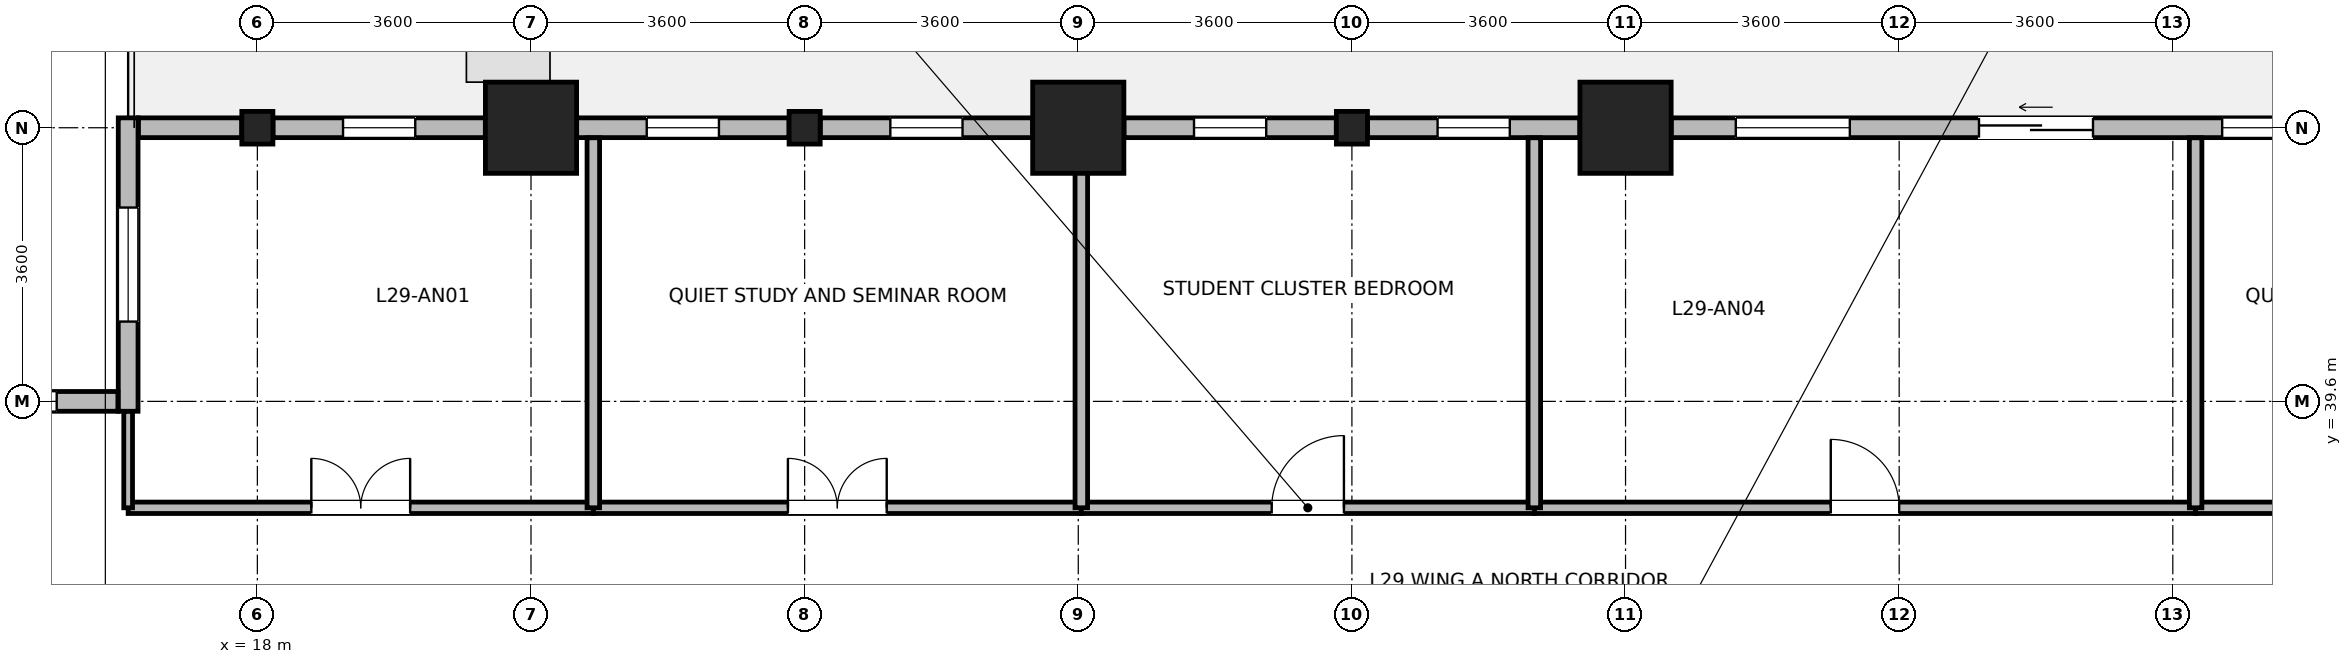
"""IFC4 building model, lengths in metres.
Left out: names, types, materials, properties, quantities, classifications, styles, units other than length and angle.
Written with IfcOpenShell. Run it as: python <this file> out.ifc"""

import sys

from ifc_helpers import new_model, si_unit, direction, frame, frame_2d, origin, origin_2d, place, context, subcontext, project, spatial, rectangle, i_section, extrude, source, transform, mapped, element, fill, save


model = new_model("IFC4")
c1 = context("Model", 3, precision=1e-05, world=origin(), true_north=direction((0.0, 1.0)))
c2 = subcontext(c1, "Body", "Model", "MODEL_VIEW")
j1 = project(units=[si_unit("LENGTHUNIT", "METRE"), si_unit("PLANEANGLEUNIT", "RADIAN")], contexts=[c1])
p1 = place(None, origin())
s1 = spatial("IfcSite", under=j1, at=p1, CompositionType="ELEMENT")
p2 = place(p1, origin())
s2 = spatial("IfcBuilding", under=s1, at=p2, CompositionType="ELEMENT")
p3 = place(p2, frame((0.0, 0.0, 115.6)))
s3 = spatial("IfcBuildingStorey", under=s2, at=p3, CompositionType="ELEMENT", Elevation=115.6)
m1 = source(origin(), c2, "Body", "SweptSolid", [
    extrude(rectangle(XDim=1.2, YDim=1.2, at=origin_2d()), origin(), (0.0, 0.0, 1.0), 3.7),
])
for number, where, z_axis, x_axis in (
    (1, (21.6, 43.2, 0.0), (0.0, 0.0, 1.0), (1.0, 0.0, 0.0)),
    (2, (28.8, 43.2, 0.0), (0.0, 0.0, 1.0), (1.0, 0.0, 0.0)),
    (3, (36.0, 43.2, 0.0), (0.0, 0.0, 1.0), (1.0, 0.0, 0.0)),
):
    element("IfcColumn", number, at=place(p3, frame(where, z_axis=z_axis, x_axis=x_axis)), inside=s3, PredefinedType="COLUMN", context=c2, shape_type="MappedRepresentation", body=[
        mapped(m1, transform((0.0, 0.0, 0.0), x_axis=(1.0, 0.0, 0.0), y_axis=(0.0, 1.0, 0.0), z_axis=(0.0, 0.0, 1.0), scale=1.0)),
    ])
m2 = source(origin(), c2, "Body", "SweptSolid", [
    extrude(i_section(OverallWidth=0.409, OverallDepth=0.43, WebThickness=0.024, FlangeThickness=0.033, FilletRadius=0.015, at=origin_2d()), origin(), (0.0, 0.0, 1.0), 3.7),
])
for number, where, z_axis, x_axis in (
    (4, (18.0, 43.2, 0.0), (0.0, 0.0, 1.0), (1.0, 0.0, 0.0)),
    (5, (25.2, 43.2, 0.0), (0.0, 0.0, 1.0), (1.0, 0.0, 0.0)),
    (6, (32.4, 43.2, 0.0), (0.0, 0.0, 1.0), (1.0, 0.0, 0.0)),
):
    element("IfcColumn", number, at=place(p3, frame(where, z_axis=z_axis, x_axis=x_axis)), inside=s3, PredefinedType="COLUMN", context=c2, shape_type="MappedRepresentation", body=[
        mapped(m2, transform((0.0, 0.0, 0.0), x_axis=(1.0, 0.0, 0.0), y_axis=(0.0, 1.0, 0.0), z_axis=(0.0, 0.0, 1.0), scale=1.0)),
    ])
p4 = place(p3, frame((36.601, 43.2, 0.0), z_axis=(0.0, 0.0, 1.0), x_axis=(1.0, 0.0, 0.0)))
e7 = element("IfcWall", 7, at=p4, inside=s3, PredefinedType="STANDARD", context=c2, shape_type="SweptSolid", body=[
    extrude(rectangle(XDim=9.598, YDim=0.26, at=frame_2d((4.799, 0.0))), origin(), (0.0, 0.0, 1.0), 2.98),
])
p5 = place(p4, frame((4.049, 0.0, 0.0)))
e8 = element("IfcOpeningElement", 8, at=p5, cuts=e7, PredefinedType="OPENING", context=c2, shape_type="SweptSolid", body=[
    extrude(rectangle(XDim=1.5, YDim=2.15, at=frame_2d((0.75, 1.075))), frame((0.0, 0.14, 0.0), z_axis=(0.0, -1.0, 0.0), x_axis=(1.0, 0.0, 0.0)), (0.0, 0.0, 1.0), 0.28),
])
p6 = place(p4, frame((0.85, 0.0, 0.85)))
e9 = element("IfcOpeningElement", 9, at=p6, cuts=e7, PredefinedType="OPENING", context=c2, shape_type="SweptSolid", body=[
    extrude(rectangle(XDim=1.5, YDim=1.85, at=frame_2d((0.75, 0.925))), frame((0.0, 0.14, 0.0), z_axis=(0.0, -1.0, 0.0), x_axis=(1.0, 0.0, 0.0)), (0.0, 0.0, 1.0), 0.28),
])
p7 = place(p4, frame((7.248, 0.0, 0.85)))
e10 = element("IfcOpeningElement", 10, at=p7, cuts=e7, PredefinedType="OPENING", context=c2, shape_type="SweptSolid", body=[
    extrude(rectangle(XDim=1.5, YDim=1.85, at=frame_2d((0.75, 0.925))), frame((0.0, 0.14, 0.0), z_axis=(0.0, -1.0, 0.0), x_axis=(1.0, 0.0, 0.0)), (0.0, 0.0, 1.0), 0.28),
])
p8 = place(p3, frame((32.605, 43.2, 0.0), z_axis=(0.0, 0.0, 1.0), x_axis=(1.0, 0.0, 0.0)))
e11 = element("IfcWall", 11, at=p8, inside=s3, PredefinedType="STANDARD", context=c2, shape_type="SweptSolid", body=[
    extrude(rectangle(XDim=2.793, YDim=0.26, at=frame_2d((1.397, 0.0))), origin(), (0.0, 0.0, 1.0), 2.98),
])
p9 = place(p8, frame((0.922, 0.0, 0.85)))
e12 = element("IfcOpeningElement", 12, at=p9, cuts=e11, PredefinedType="OPENING", context=c2, shape_type="SweptSolid", body=[
    extrude(rectangle(XDim=0.95, YDim=1.75, at=frame_2d((0.475, 0.875))), frame((0.0, 0.14, 0.0), z_axis=(0.0, -1.0, 0.0), x_axis=(1.0, 0.0, 0.0)), (0.0, 0.0, 1.0), 0.28),
])
p10 = place(p3, frame((29.401, 43.2, 0.0), z_axis=(0.0, 0.0, 1.0), x_axis=(1.0, 0.0, 0.0)))
e13 = element("IfcWall", 13, at=p10, inside=s3, PredefinedType="STANDARD", context=c2, shape_type="SweptSolid", body=[
    extrude(rectangle(XDim=2.794, YDim=0.26, at=frame_2d((1.397, 0.0))), origin(), (0.0, 0.0, 1.0), 2.98),
])
p11 = place(p10, frame((0.922, 0.0, 0.85)))
e14 = element("IfcOpeningElement", 14, at=p11, cuts=e13, PredefinedType="OPENING", context=c2, shape_type="SweptSolid", body=[
    extrude(rectangle(XDim=0.95, YDim=1.75, at=frame_2d((0.475, 0.875))), frame((0.0, 0.14, 0.0), z_axis=(0.0, -1.0, 0.0), x_axis=(1.0, 0.0, 0.0)), (0.0, 0.0, 1.0), 0.28),
])
p12 = place(p3, frame((25.406, 43.2, 0.0), z_axis=(0.0, 0.0, 1.0), x_axis=(1.0, 0.0, 0.0)))
e15 = element("IfcWall", 15, at=p12, inside=s3, PredefinedType="STANDARD", context=c2, shape_type="SweptSolid", body=[
    extrude(rectangle(XDim=2.793, YDim=0.26, at=frame_2d((1.397, 0.0))), origin(), (0.0, 0.0, 1.0), 2.98),
])
p13 = place(p12, frame((0.922, 0.0, 0.85)))
e16 = element("IfcOpeningElement", 16, at=p13, cuts=e15, PredefinedType="OPENING", context=c2, shape_type="SweptSolid", body=[
    extrude(rectangle(XDim=0.95, YDim=1.75, at=frame_2d((0.475, 0.875))), frame((0.0, 0.14, 0.0), z_axis=(0.0, -1.0, 0.0), x_axis=(1.0, 0.0, 0.0)), (0.0, 0.0, 1.0), 0.28),
])
p14 = place(p3, frame((22.201, 43.2, 0.0), z_axis=(0.0, 0.0, 1.0), x_axis=(1.0, 0.0, 0.0)))
e17 = element("IfcWall", 17, at=p14, inside=s3, PredefinedType="STANDARD", context=c2, shape_type="SweptSolid", body=[
    extrude(rectangle(XDim=2.793, YDim=0.26, at=frame_2d((1.397, 0.0))), origin(), (0.0, 0.0, 1.0), 2.98),
])
p15 = place(p14, frame((0.922, 0.0, 0.85)))
e18 = element("IfcOpeningElement", 18, at=p15, cuts=e17, PredefinedType="OPENING", context=c2, shape_type="SweptSolid", body=[
    extrude(rectangle(XDim=0.95, YDim=1.75, at=frame_2d((0.475, 0.875))), frame((0.0, 0.14, 0.0), z_axis=(0.0, -1.0, 0.0), x_axis=(1.0, 0.0, 0.0)), (0.0, 0.0, 1.0), 0.28),
])
p16 = place(p3, frame((18.206, 43.2, 0.0), z_axis=(0.0, 0.0, 1.0), x_axis=(1.0, 0.0, 0.0)))
e19 = element("IfcWall", 19, at=p16, inside=s3, PredefinedType="STANDARD", context=c2, shape_type="SweptSolid", body=[
    extrude(rectangle(XDim=2.793, YDim=0.26, at=frame_2d((1.397, 0.0))), origin(), (0.0, 0.0, 1.0), 2.98),
])
p17 = place(p16, frame((0.922, 0.0, 0.85)))
e20 = element("IfcOpeningElement", 20, at=p17, cuts=e19, PredefinedType="OPENING", context=c2, shape_type="SweptSolid", body=[
    extrude(rectangle(XDim=0.95, YDim=1.75, at=frame_2d((0.475, 0.875))), frame((0.0, 0.14, 0.0), z_axis=(0.0, -1.0, 0.0), x_axis=(1.0, 0.0, 0.0)), (0.0, 0.0, 1.0), 0.28),
])
p18 = place(p3, frame((16.435, 43.2, 0.0), z_axis=(0.0, 0.0, 1.0), x_axis=(1.0, 0.0, 0.0)))
e21 = element("IfcWall", 21, at=p18, inside=s3, PredefinedType="STANDARD", context=c2, shape_type="SweptSolid", body=[
    extrude(rectangle(XDim=1.359, YDim=0.26, at=frame_2d((0.68, 0.0))), origin(), (0.0, 0.0, 1.0), 2.98),
])
p19 = place(p3, frame((16.3, 39.47, 0.0), z_axis=(0.0, 0.0, 1.0), x_axis=(0.0, 1.0, 0.0)))
e22 = element("IfcWall", 22, at=p19, inside=s3, PredefinedType="STANDARD", context=c2, shape_type="SweptSolid", body=[
    extrude(rectangle(XDim=3.86, YDim=0.26, at=frame_2d((1.93, 0.0))), origin(), (0.0, 0.0, 1.0), 3.43),
])
p20 = place(p19, frame((1.18, 0.0, 0.85)))
e23 = element("IfcOpeningElement", 23, at=p20, cuts=e22, PredefinedType="OPENING", context=c2, shape_type="SweptSolid", body=[
    extrude(rectangle(XDim=1.5, YDim=1.85, at=frame_2d((0.75, 0.925))), frame((0.0, 0.14, 0.0), z_axis=(0.0, -1.0, 0.0), x_axis=(1.0, 0.0, 0.0)), (0.0, 0.0, 1.0), 0.28),
])
p21 = place(p3, frame((6.835, 39.6, 0.0), z_axis=(0.0, 0.0, 1.0), x_axis=(1.0, 0.0, 0.0)))
e24 = element("IfcWall", 24, at=p21, inside=s3, PredefinedType="STANDARD", context=c2, shape_type="SweptSolid", body=[
    extrude(rectangle(XDim=9.33, YDim=0.26, at=frame_2d((4.665, 0.0))), origin(), (0.0, 0.0, 1.0), 3.43),
])
p22 = place(p21, frame((0.805, 0.0, 0.85)))
e25 = element("IfcOpeningElement", 25, at=p22, cuts=e24, PredefinedType="OPENING", context=c2, shape_type="SweptSolid", body=[
    extrude(rectangle(XDim=1.5, YDim=1.85, at=frame_2d((0.75, 0.925))), frame((0.0, 0.14, 0.0), z_axis=(0.0, -1.0, 0.0), x_axis=(1.0, 0.0, 0.0)), (0.0, 0.0, 1.0), 0.28),
])
p23 = place(p21, frame((3.915, 0.0, 0.85)))
e26 = element("IfcOpeningElement", 26, at=p23, cuts=e24, PredefinedType="OPENING", context=c2, shape_type="SweptSolid", body=[
    extrude(rectangle(XDim=1.5, YDim=1.85, at=frame_2d((0.75, 0.925))), frame((0.0, 0.14, 0.0), z_axis=(0.0, -1.0, 0.0), x_axis=(1.0, 0.0, 0.0)), (0.0, 0.0, 1.0), 0.28),
])
p24 = place(p21, frame((7.025, 0.0, 0.85)))
e27 = element("IfcOpeningElement", 27, at=p24, cuts=e24, PredefinedType="OPENING", context=c2, shape_type="SweptSolid", body=[
    extrude(rectangle(XDim=1.5, YDim=1.85, at=frame_2d((0.75, 0.925))), frame((0.0, 0.14, 0.0), z_axis=(0.0, -1.0, 0.0), x_axis=(1.0, 0.0, 0.0)), (0.0, 0.0, 1.0), 0.28),
])
p25 = place(p3, frame((34.8, 38.2, 0.0), z_axis=(0.0, 0.0, 1.0), x_axis=(1.0, 0.0, 0.0)))
e28 = element("IfcWall", 28, at=p25, inside=s3, PredefinedType="PARTITIONING", context=c2, shape_type="SweptSolid", body=[
    extrude(rectangle(XDim=8.7, YDim=0.15, at=frame_2d((4.35, 0.0))), origin(), (0.0, 0.0, 1.0), 3.43),
])
p26 = place(p25, frame((3.9, 0.0, 0.0)))
e29 = element("IfcOpeningElement", 29, at=p26, cuts=e28, PredefinedType="OPENING", context=c2, shape_type="SweptSolid", body=[
    extrude(rectangle(XDim=0.9, YDim=2.08, at=frame_2d((0.45, 1.04))), frame((0.0, 0.085, 0.0), z_axis=(0.0, -1.0, 0.0), x_axis=(1.0, 0.0, 0.0)), (0.0, 0.0, 1.0), 0.17),
])
p27 = place(p3, frame((22.42, 38.2, 0.0), z_axis=(0.0, 0.0, 1.0), x_axis=(1.0, 0.0, 0.0)))
e30 = element("IfcWall", 30, at=p27, inside=s3, PredefinedType="PARTITIONING", context=c2, shape_type="SweptSolid", body=[
    extrude(rectangle(XDim=6.42, YDim=0.15, at=frame_2d((3.21, 0.0))), origin(), (0.0, 0.0, 1.0), 3.43),
])
p28 = place(p27, frame((2.56, 0.0, 0.0)))
e31 = element("IfcOpeningElement", 31, at=p28, cuts=e30, PredefinedType="OPENING", context=c2, shape_type="SweptSolid", body=[
    extrude(rectangle(XDim=1.3, YDim=2.12, at=frame_2d((0.65, 1.06))), frame((0.0, 0.085, 0.0), z_axis=(0.0, -1.0, 0.0), x_axis=(1.0, 0.0, 0.0)), (0.0, 0.0, 1.0), 0.17),
])
p29 = place(p3, frame((16.3, 38.2, 0.0), z_axis=(0.0, 0.0, 1.0), x_axis=(1.0, 0.0, 0.0)))
e32 = element("IfcWall", 32, at=p29, inside=s3, PredefinedType="PARTITIONING", context=c2, shape_type="SweptSolid", body=[
    extrude(rectangle(XDim=6.12, YDim=0.15, at=frame_2d((3.06, 0.0))), origin(), (0.0, 0.0, 1.0), 3.43),
])
p30 = place(p29, frame((2.41, 0.0, 0.0)))
e33 = element("IfcOpeningElement", 33, at=p30, cuts=e32, PredefinedType="OPENING", context=c2, shape_type="SweptSolid", body=[
    extrude(rectangle(XDim=1.3, YDim=2.12, at=frame_2d((0.65, 1.06))), frame((0.0, 0.085, 0.0), z_axis=(0.0, -1.0, 0.0), x_axis=(1.0, 0.0, 0.0)), (0.0, 0.0, 1.0), 0.17),
])
p31 = place(p3, frame((28.84, 38.2, 0.0), z_axis=(0.0, 0.0, 1.0), x_axis=(1.0, 0.0, 0.0)))
e34 = element("IfcWall", 34, at=p31, inside=s3, PredefinedType="PARTITIONING", context=c2, shape_type="SweptSolid", body=[
    extrude(rectangle(XDim=5.96, YDim=0.15, at=frame_2d((2.98, 0.0))), origin(), (0.0, 0.0, 1.0), 3.43),
])
p32 = place(p31, frame((2.505, 0.0, 0.0)))
e35 = element("IfcOpeningElement", 35, at=p32, cuts=e34, PredefinedType="OPENING", context=c2, shape_type="SweptSolid", body=[
    extrude(rectangle(XDim=0.95, YDim=2.1, at=frame_2d((0.475, 1.05))), frame((0.0, 0.085, 0.0), z_axis=(0.0, -1.0, 0.0), x_axis=(1.0, 0.0, 0.0)), (0.0, 0.0, 1.0), 0.17),
])
p33 = place(p3, frame((43.5, 38.2, 0.0), z_axis=(0.0, 0.0, 1.0), x_axis=(1.0, 0.0, 0.0)))
e36 = element("IfcWall", 36, at=p33, inside=s3, PredefinedType="PARTITIONING", context=c2, shape_type="SweptSolid", body=[
    extrude(rectangle(XDim=5.74, YDim=0.15, at=frame_2d((2.87, 0.0))), origin(), (0.0, 0.0, 1.0), 3.43),
])
p34 = place(p33, frame((2.22, 0.0, 0.0)))
e37 = element("IfcOpeningElement", 37, at=p34, cuts=e36, PredefinedType="OPENING", context=c2, shape_type="SweptSolid", body=[
    extrude(rectangle(XDim=1.3, YDim=2.12, at=frame_2d((0.65, 1.06))), frame((0.0, 0.085, 0.0), z_axis=(0.0, -1.0, 0.0), x_axis=(1.0, 0.0, 0.0)), (0.0, 0.0, 1.0), 0.17),
])
p35 = place(p3, frame((16.3, 38.2, 0.0), z_axis=(0.0, 0.0, 1.0), x_axis=(0.0, 1.0, 0.0)))
e38 = element("IfcWall", 38, at=p35, inside=s3, PredefinedType="PARTITIONING", context=c2, shape_type="SweptSolid", body=[
    extrude(rectangle(XDim=1.268, YDim=0.115, at=frame_2d((0.634, 0.0))), origin(), (0.0, 0.0, 1.0), 3.43),
])
p36 = place(p3, frame((22.42, 38.2, 0.0), z_axis=(0.0, 0.0, 1.0), x_axis=(0.0, 1.0, 0.0)))
e39 = element("IfcWall", 39, at=p36, inside=s3, PredefinedType="PARTITIONING", context=c2, shape_type="SweptSolid", body=[
    extrude(rectangle(XDim=4.868, YDim=0.165, at=frame_2d((2.434, 0.0))), origin(), (0.0, 0.0, 1.0), 3.43),
])
p37 = place(p3, frame((28.84, 38.2, 0.0), z_axis=(0.0, 0.0, 1.0), x_axis=(0.0, 1.0, 0.0)))
e40 = element("IfcWall", 40, at=p37, inside=s3, PredefinedType="PARTITIONING", context=c2, shape_type="SweptSolid", body=[
    extrude(rectangle(XDim=4.868, YDim=0.165, at=frame_2d((2.434, 0.0))), origin(), (0.0, 0.0, 1.0), 2.93),
])
for number, where, z_axis, x_axis in (
    (41, (34.8, 38.2, 0.0), (0.0, 0.0, 1.0), (0.0, 1.0, 0.0)),
    (42, (43.5, 38.2, 0.0), (0.0, 0.0, 1.0), (0.0, 1.0, 0.0)),
):
    element("IfcWall", number, at=place(p3, frame(where, z_axis=z_axis, x_axis=x_axis)), inside=s3, PredefinedType="PARTITIONING", context=c2, shape_type="SweptSolid", body=[
        extrude(rectangle(XDim=4.868, YDim=0.165, at=frame_2d((2.434, 0.0))), origin(), (0.0, 0.0, 1.0), 3.43),
    ])
p38 = place(p5, origin())
e43 = element("IfcDoor", 43, at=p38, inside=s3, OperationType="SLIDING_TO_LEFT", PredefinedType="DOOR", context=c2, shape_type="SweptSolid", body=[
    extrude(rectangle(XDim=1.5, YDim=2.15, at=frame_2d((0.75, 1.075))), frame((0.0, 0.025, 0.0), z_axis=(0.0, -1.0, 0.0), x_axis=(1.0, 0.0, 0.0)), (0.0, 0.0, 1.0), 0.05),
])
fill(e8, e43)
p39 = place(p6, origin())
e44 = element("IfcWindow", 44, at=p39, inside=s3, PartitioningType="SINGLE_PANEL", PredefinedType="WINDOW", context=c2, shape_type="SweptSolid", body=[
    extrude(rectangle(XDim=1.5, YDim=1.85, at=frame_2d((0.75, 0.925))), frame((0.0, 0.03, 0.0), z_axis=(0.0, -1.0, 0.0), x_axis=(1.0, 0.0, 0.0)), (0.0, 0.0, 1.0), 0.06),
])
fill(e9, e44)
p40 = place(p7, origin())
e45 = element("IfcWindow", 45, at=p40, inside=s3, PartitioningType="SINGLE_PANEL", PredefinedType="WINDOW", context=c2, shape_type="SweptSolid", body=[
    extrude(rectangle(XDim=1.5, YDim=1.85, at=frame_2d((0.75, 0.925))), frame((0.0, 0.03, 0.0), z_axis=(0.0, -1.0, 0.0), x_axis=(1.0, 0.0, 0.0)), (0.0, 0.0, 1.0), 0.06),
])
fill(e10, e45)
p41 = place(p9, origin())
e46 = element("IfcWindow", 46, at=p41, inside=s3, PartitioningType="SINGLE_PANEL", PredefinedType="WINDOW", context=c2, shape_type="SweptSolid", body=[
    extrude(rectangle(XDim=0.95, YDim=1.75, at=frame_2d((0.475, 0.875))), frame((0.0, 0.03, 0.0), z_axis=(0.0, -1.0, 0.0), x_axis=(1.0, 0.0, 0.0)), (0.0, 0.0, 1.0), 0.06),
])
fill(e12, e46)
p42 = place(p11, origin())
e47 = element("IfcWindow", 47, at=p42, inside=s3, PartitioningType="SINGLE_PANEL", PredefinedType="WINDOW", context=c2, shape_type="SweptSolid", body=[
    extrude(rectangle(XDim=0.95, YDim=1.75, at=frame_2d((0.475, 0.875))), frame((0.0, 0.03, 0.0), z_axis=(0.0, -1.0, 0.0), x_axis=(1.0, 0.0, 0.0)), (0.0, 0.0, 1.0), 0.06),
])
fill(e14, e47)
p43 = place(p13, origin())
e48 = element("IfcWindow", 48, at=p43, inside=s3, PartitioningType="SINGLE_PANEL", PredefinedType="WINDOW", context=c2, shape_type="SweptSolid", body=[
    extrude(rectangle(XDim=0.95, YDim=1.75, at=frame_2d((0.475, 0.875))), frame((0.0, 0.03, 0.0), z_axis=(0.0, -1.0, 0.0), x_axis=(1.0, 0.0, 0.0)), (0.0, 0.0, 1.0), 0.06),
])
fill(e16, e48)
p44 = place(p15, origin())
e49 = element("IfcWindow", 49, at=p44, inside=s3, PartitioningType="SINGLE_PANEL", PredefinedType="WINDOW", context=c2, shape_type="SweptSolid", body=[
    extrude(rectangle(XDim=0.95, YDim=1.75, at=frame_2d((0.475, 0.875))), frame((0.0, 0.03, 0.0), z_axis=(0.0, -1.0, 0.0), x_axis=(1.0, 0.0, 0.0)), (0.0, 0.0, 1.0), 0.06),
])
fill(e18, e49)
p45 = place(p17, origin())
e50 = element("IfcWindow", 50, at=p45, inside=s3, PartitioningType="SINGLE_PANEL", PredefinedType="WINDOW", context=c2, shape_type="SweptSolid", body=[
    extrude(rectangle(XDim=0.95, YDim=1.75, at=frame_2d((0.475, 0.875))), frame((0.0, 0.03, 0.0), z_axis=(0.0, -1.0, 0.0), x_axis=(1.0, 0.0, 0.0)), (0.0, 0.0, 1.0), 0.06),
])
fill(e20, e50)
p46 = place(p20, origin())
e51 = element("IfcWindow", 51, at=p46, inside=s3, PartitioningType="SINGLE_PANEL", PredefinedType="WINDOW", context=c2, shape_type="SweptSolid", body=[
    extrude(rectangle(XDim=1.5, YDim=1.85, at=frame_2d((0.75, 0.925))), frame((0.0, 0.03, 0.0), z_axis=(0.0, -1.0, 0.0), x_axis=(1.0, 0.0, 0.0)), (0.0, 0.0, 1.0), 0.06),
])
fill(e23, e51)
p47 = place(p24, origin())
e52 = element("IfcWindow", 52, at=p47, inside=s3, PartitioningType="SINGLE_PANEL", PredefinedType="WINDOW", context=c2, shape_type="SweptSolid", body=[
    extrude(rectangle(XDim=1.5, YDim=1.85, at=frame_2d((0.75, 0.925))), frame((0.0, 0.03, 0.0), z_axis=(0.0, -1.0, 0.0), x_axis=(1.0, 0.0, 0.0)), (0.0, 0.0, 1.0), 0.06),
])
fill(e27, e52)
p48 = place(p26, origin())
e53 = element("IfcDoor", 53, at=p48, inside=s3, OperationType="SINGLE_SWING_LEFT", PredefinedType="DOOR", context=c2, shape_type="SweptSolid", body=[
    extrude(rectangle(XDim=0.9, YDim=2.08, at=frame_2d((0.45, 1.04))), frame((0.0, 0.025, 0.0), z_axis=(0.0, -1.0, 0.0), x_axis=(1.0, 0.0, 0.0)), (0.0, 0.0, 1.0), 0.05),
])
fill(e29, e53)
p49 = place(p28, origin())
e54 = element("IfcDoor", 54, at=p49, inside=s3, OperationType="DOUBLE_DOOR_SINGLE_SWING", PredefinedType="DOOR", context=c2, shape_type="SweptSolid", body=[
    extrude(rectangle(XDim=1.3, YDim=2.12, at=frame_2d((0.65, 1.06))), frame((0.0, 0.025, 0.0), z_axis=(0.0, -1.0, 0.0), x_axis=(1.0, 0.0, 0.0)), (0.0, 0.0, 1.0), 0.05),
])
fill(e31, e54)
p50 = place(p30, origin())
e55 = element("IfcDoor", 55, at=p50, inside=s3, OperationType="DOUBLE_DOOR_SINGLE_SWING", PredefinedType="DOOR", context=c2, shape_type="SweptSolid", body=[
    extrude(rectangle(XDim=1.3, YDim=2.12, at=frame_2d((0.65, 1.06))), frame((0.0, 0.025, 0.0), z_axis=(0.0, -1.0, 0.0), x_axis=(1.0, 0.0, 0.0)), (0.0, 0.0, 1.0), 0.05),
])
fill(e33, e55)
p51 = place(p32, origin())
e56 = element("IfcDoor", 56, at=p51, inside=s3, OperationType="SINGLE_SWING_RIGHT", PredefinedType="DOOR", context=c2, shape_type="SweptSolid", body=[
    extrude(rectangle(XDim=0.95, YDim=2.1, at=frame_2d((0.475, 1.05))), frame((0.0, 0.025, 0.0), z_axis=(0.0, -1.0, 0.0), x_axis=(1.0, 0.0, 0.0)), (0.0, 0.0, 1.0), 0.05),
])
fill(e35, e56)
save(model, sys.argv[1])
